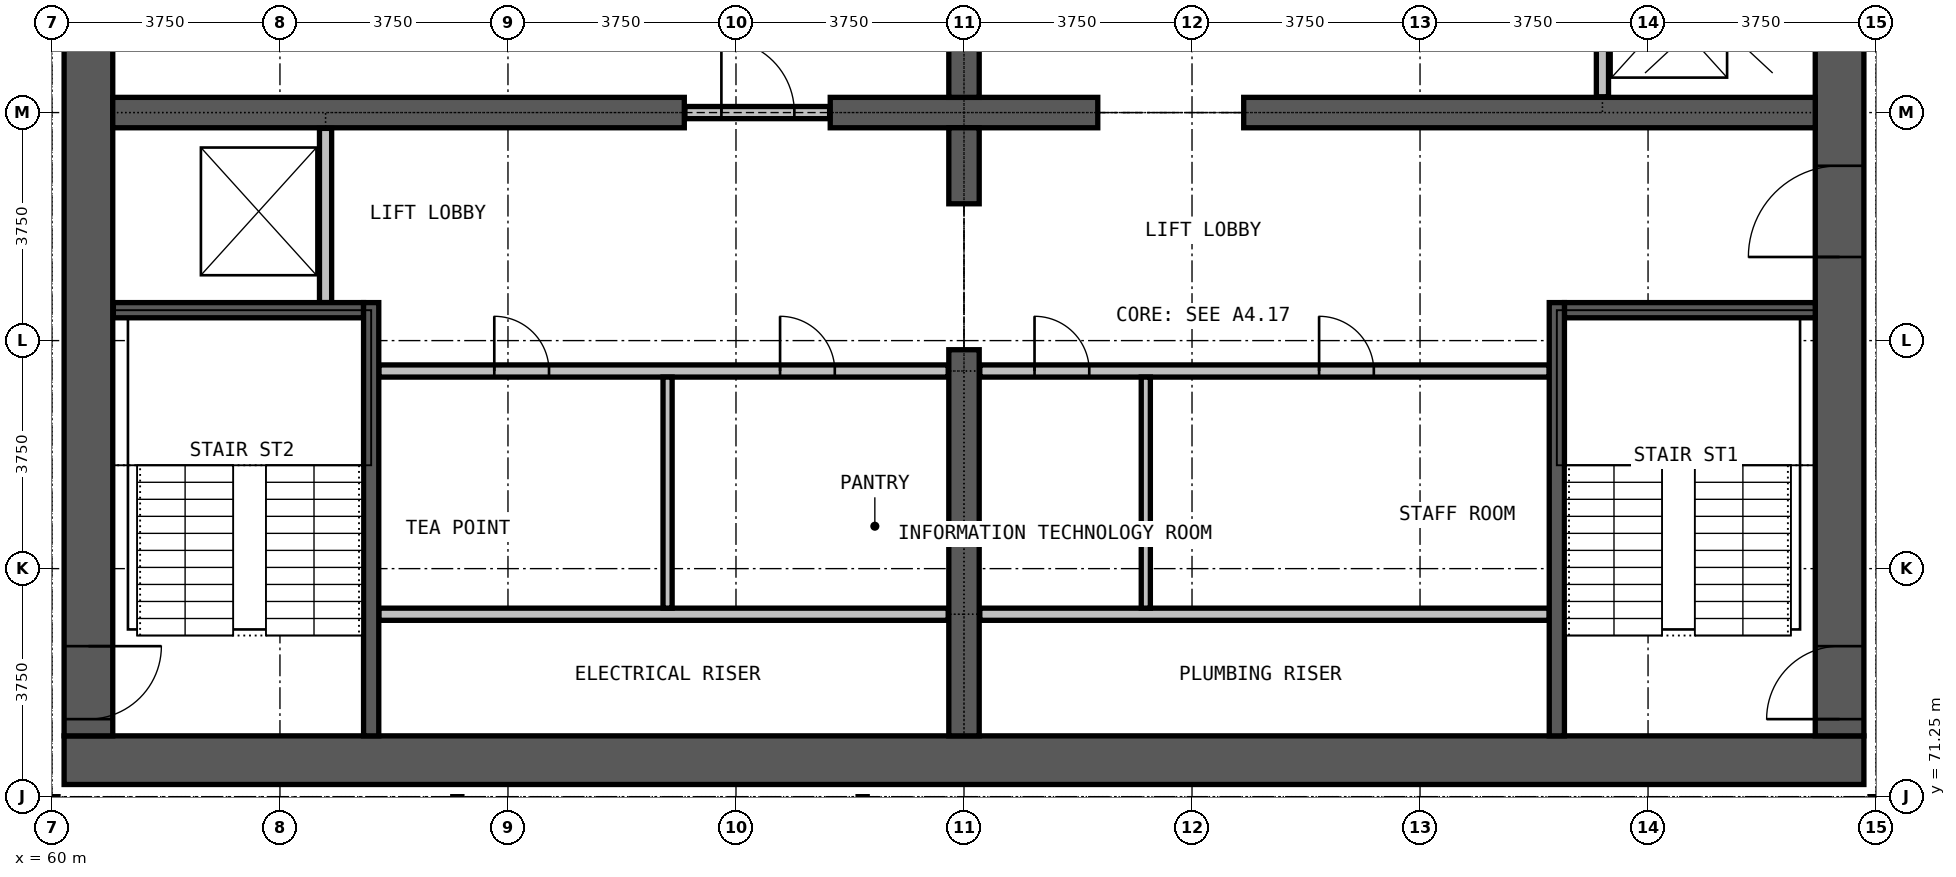
"""IFC4 building model, lengths in metres.
Left out: names, types, materials, properties, quantities, classifications, styles, units other than length and angle.
Written with IfcOpenShell. Run it as: python <this file> out.ifc"""

import sys

from ifc_helpers import new_model, si_unit, direction, frame, frame_2d, origin, place, context, subcontext, project, spatial, rectangle, extrude, element, fill, save


model = new_model("IFC4")
c1 = context("Model", 3, precision=1e-05, world=origin(), true_north=direction((0.0, 1.0)))
c2 = subcontext(c1, "Body", "Model", "MODEL_VIEW")
j1 = project(units=[si_unit("LENGTHUNIT", "METRE"), si_unit("PLANEANGLEUNIT", "RADIAN")], contexts=[c1])
p1 = place(None, origin())
s1 = spatial("IfcSite", under=j1, at=p1, CompositionType="ELEMENT")
p2 = place(p1, origin())
s2 = spatial("IfcBuilding", under=s1, at=p2, CompositionType="ELEMENT")
p3 = place(p2, frame((0.0, 0.0, 151.3)))
s3 = spatial("IfcBuildingStorey", under=s2, at=p3, CompositionType="ELEMENT", Elevation=151.3)
p4 = place(p3, frame((60.2, 71.85, 0.0), z_axis=(0.0, 0.0, 1.0), x_axis=(1.0, 0.0, 0.0)))
e1 = element("IfcWall", 1, at=p4, inside=s3, PredefinedType="SHEAR", context=c2, shape_type="SweptSolid", body=[
    extrude(rectangle(XDim=29.6, YDim=0.8, at=frame_2d((14.8, 0.0))), origin(), (0.0, 0.0, 1.0), 3.6),
])
p5 = place(p3, frame((89.4, 72.25, 0.0), z_axis=(0.0, 0.0, 1.0), x_axis=(0.0, 1.0, 0.0)))
e2 = element("IfcWall", 2, at=p5, inside=s3, PredefinedType="SHEAR", context=c2, shape_type="SweptSolid", body=[
    extrude(rectangle(XDim=20.5, YDim=0.8, at=frame_2d((10.25, 0.0))), origin(), (0.0, 0.0, 1.0), 3.6),
])
p6 = place(p5, frame((0.275, 0.0, 0.0)))
e3 = element("IfcOpeningElement", 3, at=p6, cuts=e2, PredefinedType="OPENING", context=c2, shape_type="SweptSolid", body=[
    extrude(rectangle(XDim=1.2, YDim=2.2, at=frame_2d((0.6, 1.1))), frame((0.0, 0.41, 0.0), z_axis=(0.0, -1.0, 0.0), x_axis=(1.0, 0.0, 0.0)), (0.0, 0.0, 1.0), 0.82),
])
p7 = place(p5, frame((13.775, 0.0, 0.0)))
e4 = element("IfcOpeningElement", 4, at=p7, cuts=e2, PredefinedType="OPENING", context=c2, shape_type="SweptSolid", body=[
    extrude(rectangle(XDim=1.2, YDim=2.2, at=frame_2d((0.6, 1.1))), frame((0.0, 0.41, 0.0), z_axis=(0.0, -1.0, 0.0), x_axis=(1.0, 0.0, 0.0)), (0.0, 0.0, 1.0), 0.82),
])
p8 = place(p5, frame((7.875, 0.0, 0.0)))
e5 = element("IfcOpeningElement", 5, at=p8, cuts=e2, PredefinedType="OPENING", context=c2, shape_type="SweptSolid", body=[
    extrude(rectangle(XDim=1.5, YDim=2.2, at=frame_2d((0.75, 1.1))), frame((0.0, 0.41, 0.0), z_axis=(0.0, -1.0, 0.0), x_axis=(1.0, 0.0, 0.0)), (0.0, 0.0, 1.0), 0.82),
])
p9 = place(p3, frame((60.6, 92.75, 0.0), z_axis=(0.0, 0.0, 1.0), x_axis=(0.0, -1.0, 0.0)))
e6 = element("IfcWall", 6, at=p9, inside=s3, PredefinedType="SHEAR", context=c2, shape_type="SweptSolid", body=[
    extrude(rectangle(XDim=20.5, YDim=0.8, at=frame_2d((10.25, 0.0))), origin(), (0.0, 0.0, 1.0), 3.6),
])
p10 = place(p9, frame((19.025, 0.0, 0.0)))
e7 = element("IfcOpeningElement", 7, at=p10, cuts=e6, PredefinedType="OPENING", context=c2, shape_type="SweptSolid", body=[
    extrude(rectangle(XDim=1.2, YDim=2.2, at=frame_2d((0.6, 1.1))), frame((0.0, 0.41, 0.0), z_axis=(0.0, -1.0, 0.0), x_axis=(1.0, 0.0, 0.0)), (0.0, 0.0, 1.0), 0.82),
])
p11 = place(p9, frame((8.025, 0.0, 0.0)))
e8 = element("IfcOpeningElement", 8, at=p11, cuts=e6, PredefinedType="OPENING", context=c2, shape_type="SweptSolid", body=[
    extrude(rectangle(XDim=1.2, YDim=2.2, at=frame_2d((0.6, 1.1))), frame((0.0, 0.41, 0.0), z_axis=(0.0, -1.0, 0.0), x_axis=(1.0, 0.0, 0.0)), (0.0, 0.0, 1.0), 0.82),
])
p12 = place(p3, frame((61.0, 82.5, 0.0), z_axis=(0.0, 0.0, 1.0), x_axis=(1.0, 0.0, 0.0)))
e9 = element("IfcWall", 9, at=p12, inside=s3, PredefinedType="SHEAR", context=c2, shape_type="SweptSolid", body=[
    extrude(rectangle(XDim=9.4, YDim=0.5, at=frame_2d((4.7, 0.0))), origin(), (0.0, 0.0, 1.0), 3.6),
])
p13 = place(p3, frame((72.8, 82.5, 0.0), z_axis=(0.0, 0.0, 1.0), x_axis=(1.0, 0.0, 0.0)))
e10 = element("IfcWall", 10, at=p13, inside=s3, PredefinedType="SHEAR", context=c2, shape_type="SweptSolid", body=[
    extrude(rectangle(XDim=4.4, YDim=0.5, at=frame_2d((2.2, 0.0))), origin(), (0.0, 0.0, 1.0), 3.6),
])
p14 = place(p3, frame((79.6, 82.5, 0.0), z_axis=(0.0, 0.0, 1.0), x_axis=(1.0, 0.0, 0.0)))
e11 = element("IfcWall", 11, at=p14, inside=s3, PredefinedType="SHEAR", context=c2, shape_type="SweptSolid", body=[
    extrude(rectangle(XDim=9.4, YDim=0.5, at=frame_2d((4.7, 0.0))), origin(), (0.0, 0.0, 1.0), 3.6),
])
p15 = place(p3, frame((75.0, 72.25, 0.0), z_axis=(0.0, 0.0, 1.0), x_axis=(0.0, 1.0, 0.0)))
e12 = element("IfcWall", 12, at=p15, inside=s3, PredefinedType="SHEAR", context=c2, shape_type="SweptSolid", body=[
    extrude(rectangle(XDim=6.35, YDim=0.5, at=frame_2d((3.175, 0.0))), origin(), (0.0, 0.0, 1.0), 3.6),
])
for number, where, z_axis, x_axis in (
    (13, (75.0, 81.0, 0.0), (0.0, 0.0, 1.0), (0.0, 1.0, 0.0)),
    (14, (75.0, 82.75, 0.0), (0.0, 0.0, 1.0), (0.0, 1.0, 0.0)),
):
    element("IfcWall", number, at=place(p3, frame(where, z_axis=z_axis, x_axis=x_axis)), inside=s3, PredefinedType="SHEAR", context=c2, shape_type="SweptSolid", body=[
        extrude(rectangle(XDim=1.25, YDim=0.5, at=frame_2d((0.625, 0.0))), origin(), (0.0, 0.0, 1.0), 3.6),
    ])
for number, where, z_axis, x_axis in (
    (15, (65.375, 74.25, 0.0), (0.0, 0.0, 1.0), (1.0, 0.0, 0.0)),
    (16, (75.26, 74.25, 0.0), (0.0, 0.0, 1.0), (1.0, 0.0, 0.0)),
):
    element("IfcWall", number, at=place(p3, frame(where, z_axis=z_axis, x_axis=x_axis)), inside=s3, PredefinedType="PARTITIONING", context=c2, shape_type="SweptSolid", body=[
        extrude(rectangle(XDim=9.365, YDim=0.2, at=frame_2d((4.683, 0.0))), origin(), (0.0, 0.0, 1.0), 3.3),
    ])
p16 = place(p3, frame((65.375, 78.25, 0.0), z_axis=(0.0, 0.0, 1.0), x_axis=(1.0, 0.0, 0.0)))
e17 = element("IfcWall", 17, at=p16, inside=s3, PredefinedType="PARTITIONING", context=c2, shape_type="SweptSolid", body=[
    extrude(rectangle(XDim=9.365, YDim=0.2, at=frame_2d((4.683, 0.0))), origin(), (0.0, 0.0, 1.0), 3.3),
])
p17 = place(p16, frame((1.9, 0.0, 0.0)))
e18 = element("IfcOpeningElement", 18, at=p17, cuts=e17, PredefinedType="OPENING", context=c2, shape_type="SweptSolid", body=[
    extrude(rectangle(XDim=0.9, YDim=2.2, at=frame_2d((0.45, 1.1))), frame((0.0, 0.11, 0.0), z_axis=(0.0, -1.0, 0.0), x_axis=(1.0, 0.0, 0.0)), (0.0, 0.0, 1.0), 0.22),
])
p18 = place(p16, frame((6.6, 0.0, 0.0)))
e19 = element("IfcOpeningElement", 19, at=p18, cuts=e17, PredefinedType="OPENING", context=c2, shape_type="SweptSolid", body=[
    extrude(rectangle(XDim=0.9, YDim=2.2, at=frame_2d((0.45, 1.1))), frame((0.0, 0.11, 0.0), z_axis=(0.0, -1.0, 0.0), x_axis=(1.0, 0.0, 0.0)), (0.0, 0.0, 1.0), 0.22),
])
p19 = place(p3, frame((75.26, 78.25, 0.0), z_axis=(0.0, 0.0, 1.0), x_axis=(1.0, 0.0, 0.0)))
e20 = element("IfcWall", 20, at=p19, inside=s3, PredefinedType="PARTITIONING", context=c2, shape_type="SweptSolid", body=[
    extrude(rectangle(XDim=9.365, YDim=0.2, at=frame_2d((4.683, 0.0))), origin(), (0.0, 0.0, 1.0), 3.3),
])
p20 = place(p19, frame((0.9, 0.0, 0.0)))
e21 = element("IfcOpeningElement", 21, at=p20, cuts=e20, PredefinedType="OPENING", context=c2, shape_type="SweptSolid", body=[
    extrude(rectangle(XDim=0.9, YDim=2.2, at=frame_2d((0.45, 1.1))), frame((0.0, 0.11, 0.0), z_axis=(0.0, -1.0, 0.0), x_axis=(1.0, 0.0, 0.0)), (0.0, 0.0, 1.0), 0.22),
])
p21 = place(p19, frame((5.58, 0.0, 0.0)))
e22 = element("IfcOpeningElement", 22, at=p21, cuts=e20, PredefinedType="OPENING", context=c2, shape_type="SweptSolid", body=[
    extrude(rectangle(XDim=0.9, YDim=2.2, at=frame_2d((0.45, 1.1))), frame((0.0, 0.11, 0.0), z_axis=(0.0, -1.0, 0.0), x_axis=(1.0, 0.0, 0.0)), (0.0, 0.0, 1.0), 0.22),
])
p22 = place(p3, frame((70.41, 82.5, 0.0), z_axis=(0.0, 0.0, 1.0), x_axis=(1.0, 0.0, 0.0)))
e23 = element("IfcWall", 23, at=p22, inside=s3, PredefinedType="PARTITIONING", context=c2, shape_type="SweptSolid", body=[
    extrude(rectangle(XDim=2.38, YDim=0.2, at=frame_2d((1.19, 0.0))), origin(), (0.0, 0.0, 1.0), 2.4),
])
p23 = place(p22, frame((0.6, 0.0, 0.0)))
e24 = element("IfcOpeningElement", 24, at=p23, cuts=e23, PredefinedType="OPENING", context=c2, shape_type="SweptSolid", body=[
    extrude(rectangle(XDim=1.2, YDim=2.2, at=frame_2d((0.6, 1.1))), frame((0.0, 0.11, 0.0), z_axis=(0.0, -1.0, 0.0), x_axis=(1.0, 0.0, 0.0)), (0.0, 0.0, 1.0), 0.22),
])
for number, where, z_axis, x_axis in (
    (25, (70.125, 74.35, 0.0), (0.0, 0.0, 1.0), (0.0, 1.0, 0.0)),
    (26, (77.99, 74.35, 0.0), (0.0, 0.0, 1.0), (0.0, 1.0, 0.0)),
):
    element("IfcWall", number, at=place(p3, frame(where, z_axis=z_axis, x_axis=x_axis)), inside=s3, PredefinedType="PARTITIONING", context=c2, shape_type="SweptSolid", body=[
        extrude(rectangle(XDim=3.8, YDim=0.15, at=frame_2d((1.9, 0.0))), origin(), (0.0, 0.0, 1.0), 3.3),
    ])
p24 = place(p3, frame((64.5, 79.375, 0.0), z_axis=(0.0, 0.0, 1.0), x_axis=(0.0, 1.0, 0.0)))
e27 = element("IfcWall", 27, at=p24, inside=s3, PredefinedType="PARTITIONING", context=c2, shape_type="SweptSolid", body=[
    extrude(rectangle(XDim=2.865, YDim=0.2, at=frame_2d((1.433, 0.0))), origin(), (0.0, 0.0, 1.0), 3.3),
])
p25 = place(p3, frame((85.5, 82.76, 0.0), z_axis=(0.0, 0.0, 1.0), x_axis=(0.0, 1.0, 0.0)))
e28 = element("IfcWall", 28, at=p25, inside=s3, PredefinedType="PARTITIONING", context=c2, shape_type="SweptSolid", body=[
    extrude(rectangle(XDim=2.865, YDim=0.2, at=frame_2d((1.433, 0.0))), origin(), (0.0, 0.0, 1.0), 3.3),
])
p26 = place(p25, frame((0.9, 0.0, 0.0)))
e29 = element("IfcOpeningElement", 29, at=p26, cuts=e28, PredefinedType="OPENING", context=c2, shape_type="SweptSolid", body=[
    extrude(rectangle(XDim=1.1, YDim=2.2, at=frame_2d((0.55, 1.1))), frame((0.0, 0.11, 0.0), z_axis=(0.0, -1.0, 0.0), x_axis=(1.0, 0.0, 0.0)), (0.0, 0.0, 1.0), 0.22),
])
p27 = place(p3, frame((61.01, 79.25, 0.0), z_axis=(0.0, 0.0, 1.0), x_axis=(1.0, 0.0, 0.0)))
e30 = element("IfcWall", 30, at=p27, inside=s3, PredefinedType="PARTITIONING", context=c2, shape_type="SweptSolid", body=[
    extrude(rectangle(XDim=4.115, YDim=0.25, at=frame_2d((2.058, 0.0))), origin(), (0.0, 0.0, 1.0), 3.3),
])
p28 = place(p3, frame((84.875, 79.25, 0.0), z_axis=(0.0, 0.0, 1.0), x_axis=(1.0, 0.0, 0.0)))
e31 = element("IfcWall", 31, at=p28, inside=s3, PredefinedType="PARTITIONING", context=c2, shape_type="SweptSolid", body=[
    extrude(rectangle(XDim=4.125, YDim=0.25, at=frame_2d((2.062, 0.0))), origin(), (0.0, 0.0, 1.0), 3.3),
])
for number, where, z_axis, x_axis in (
    (32, (65.25, 72.25, 0.0), (0.0, 0.0, 1.0), (0.0, 1.0, 0.0)),
    (33, (84.75, 72.25, 0.0), (0.0, 0.0, 1.0), (0.0, 1.0, 0.0)),
):
    element("IfcWall", number, at=place(p3, frame(where, z_axis=z_axis, x_axis=x_axis)), inside=s3, PredefinedType="PARTITIONING", context=c2, shape_type="SweptSolid", body=[
        extrude(rectangle(XDim=7.125, YDim=0.25, at=frame_2d((3.562, 0.0))), origin(), (0.0, 0.0, 1.0), 3.3),
    ])
p29 = place(p23, origin())
e34 = element("IfcDoor", 34, at=p29, inside=s3, OperationType="SINGLE_SWING_RIGHT", PredefinedType="DOOR", context=c2, shape_type="SweptSolid", body=[
    extrude(rectangle(XDim=1.2, YDim=2.2, at=frame_2d((0.6, 1.1))), frame((0.0, 0.025, 0.0), z_axis=(0.0, -1.0, 0.0), x_axis=(1.0, 0.0, 0.0)), (0.0, 0.0, 1.0), 0.05),
])
fill(e24, e34)
p30 = place(p6, origin())
e35 = element("IfcDoor", 35, at=p30, inside=s3, OperationType="SINGLE_SWING_LEFT", PredefinedType="DOOR", context=c2, shape_type="SweptSolid", body=[
    extrude(rectangle(XDim=1.2, YDim=2.2, at=frame_2d((0.6, 1.1))), frame((0.0, 0.025, 0.0), z_axis=(0.0, -1.0, 0.0), x_axis=(1.0, 0.0, 0.0)), (0.0, 0.0, 1.0), 0.05),
])
fill(e3, e35)
p31 = place(p10, origin())
e36 = element("IfcDoor", 36, at=p31, inside=s3, OperationType="SINGLE_SWING_RIGHT", PredefinedType="DOOR", context=c2, shape_type="SweptSolid", body=[
    extrude(rectangle(XDim=1.2, YDim=2.2, at=frame_2d((0.6, 1.1))), frame((0.0, 0.025, 0.0), z_axis=(0.0, -1.0, 0.0), x_axis=(1.0, 0.0, 0.0)), (0.0, 0.0, 1.0), 0.05),
])
fill(e7, e36)
p32 = place(p8, origin())
e37 = element("IfcDoor", 37, at=p32, inside=s3, OperationType="DOUBLE_DOOR_SINGLE_SWING", PredefinedType="DOOR", context=c2, shape_type="SweptSolid", body=[
    extrude(rectangle(XDim=1.5, YDim=2.2, at=frame_2d((0.75, 1.1))), frame((0.0, 0.025, 0.0), z_axis=(0.0, -1.0, 0.0), x_axis=(1.0, 0.0, 0.0)), (0.0, 0.0, 1.0), 0.05),
])
fill(e5, e37)
p33 = place(p17, origin())
e38 = element("IfcDoor", 38, at=p33, inside=s3, OperationType="SINGLE_SWING_LEFT", PredefinedType="DOOR", context=c2, shape_type="SweptSolid", body=[
    extrude(rectangle(XDim=0.9, YDim=2.2, at=frame_2d((0.45, 1.1))), frame((0.0, 0.025, 0.0), z_axis=(0.0, -1.0, 0.0), x_axis=(1.0, 0.0, 0.0)), (0.0, 0.0, 1.0), 0.05),
])
fill(e18, e38)
p34 = place(p18, origin())
e39 = element("IfcDoor", 39, at=p34, inside=s3, OperationType="SINGLE_SWING_RIGHT", PredefinedType="DOOR", context=c2, shape_type="SweptSolid", body=[
    extrude(rectangle(XDim=0.9, YDim=2.2, at=frame_2d((0.45, 1.1))), frame((0.0, 0.025, 0.0), z_axis=(0.0, -1.0, 0.0), x_axis=(1.0, 0.0, 0.0)), (0.0, 0.0, 1.0), 0.05),
])
fill(e19, e39)
p35 = place(p20, origin())
e40 = element("IfcDoor", 40, at=p35, inside=s3, OperationType="SINGLE_SWING_RIGHT", PredefinedType="DOOR", context=c2, shape_type="SweptSolid", body=[
    extrude(rectangle(XDim=0.9, YDim=2.2, at=frame_2d((0.45, 1.1))), frame((0.0, 0.025, 0.0), z_axis=(0.0, -1.0, 0.0), x_axis=(1.0, 0.0, 0.0)), (0.0, 0.0, 1.0), 0.05),
])
fill(e21, e40)
p36 = place(p21, origin())
e41 = element("IfcDoor", 41, at=p36, inside=s3, OperationType="SINGLE_SWING_LEFT", PredefinedType="DOOR", context=c2, shape_type="SweptSolid", body=[
    extrude(rectangle(XDim=0.9, YDim=2.2, at=frame_2d((0.45, 1.1))), frame((0.0, 0.025, 0.0), z_axis=(0.0, -1.0, 0.0), x_axis=(1.0, 0.0, 0.0)), (0.0, 0.0, 1.0), 0.05),
])
fill(e22, e41)
save(model, sys.argv[1])
